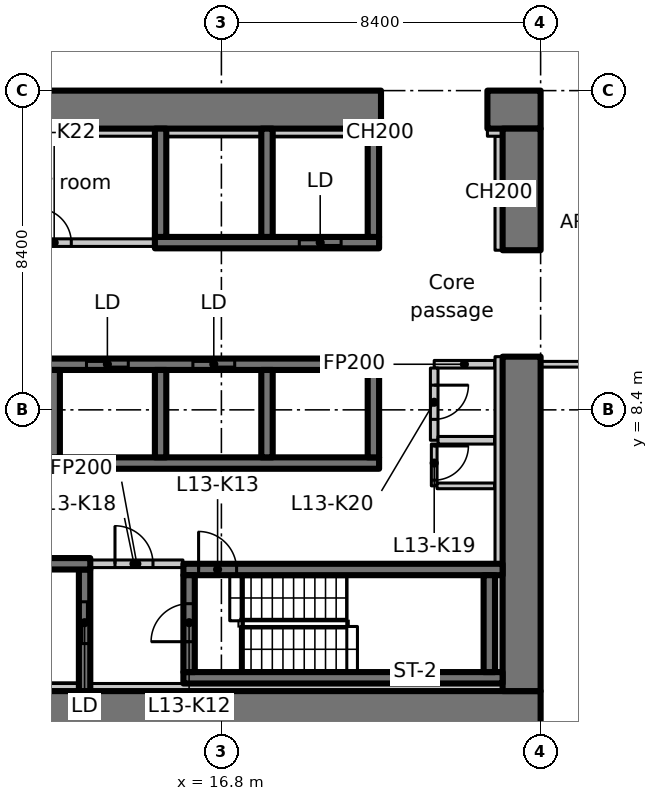
"""IFC4 building model, lengths in metres.
Left out: names, types, materials, properties, quantities, classifications, styles, units other than length and angle.
Written with IfcOpenShell. Run it as: python <this file> out.ifc"""

import sys

from ifc_helpers import new_model, si_unit, direction, frame, frame_2d, origin, place, context, subcontext, project, spatial, rectangle, extrude, element, fill, save


model = new_model("IFC4")
c1 = context("Model", 3, precision=1e-05, world=origin(), true_north=direction((0.0, 1.0)))
c2 = subcontext(c1, "Body", "Model", "MODEL_VIEW")
j1 = project(units=[si_unit("LENGTHUNIT", "METRE"), si_unit("PLANEANGLEUNIT", "RADIAN")], contexts=[c1])
p1 = place(None, origin())
s1 = spatial("IfcSite", under=j1, at=p1, CompositionType="ELEMENT")
p2 = place(p1, origin())
s2 = spatial("IfcBuilding", under=s1, at=p2, CompositionType="ELEMENT")
p3 = place(p2, frame((0.0, 0.0, 61.7)))
s3 = spatial("IfcBuildingStorey", under=s2, at=p3, CompositionType="ELEMENT", Elevation=61.7)
p4 = place(p3, frame((6.936, 0.5, 0.0), z_axis=(0.0, 0.0, 1.0), x_axis=(1.0, 0.0, 0.0)))
e1 = element("IfcWall", 1, at=p4, inside=s3, PredefinedType="SHEAR", context=c2, shape_type="SweptSolid", body=[
    extrude(rectangle(XDim=18.264, YDim=1.0, at=frame_2d((9.132, 0.0))), origin(), (0.0, 0.0, 1.0), 3.35),
])
p5 = place(p3, frame((-1.1, 16.3, 0.0), z_axis=(0.0, 0.0, 1.0), x_axis=(1.0, 0.0, 0.0)))
e2 = element("IfcWall", 2, at=p5, inside=s3, PredefinedType="SHEAR", context=c2, shape_type="SweptSolid", body=[
    extrude(rectangle(XDim=22.1, YDim=1.0, at=frame_2d((11.05, 0.0))), origin(), (0.0, 0.0, 1.0), 3.35),
])
p6 = place(p5, frame((3.15, 0.0, 0.0)))
e3 = element("IfcOpeningElement", 3, at=p6, cuts=e2, PredefinedType="OPENING", context=c2, shape_type="SweptSolid", body=[
    extrude(rectangle(XDim=1.1, YDim=2.3, at=frame_2d((0.55, 1.15))), frame((0.0, 0.51, 0.0), z_axis=(0.0, -1.0, 0.0), x_axis=(1.0, 0.0, 0.0)), (0.0, 0.0, 1.0), 1.02),
])
p7 = place(p3, frame((23.8, 16.3, 0.0), z_axis=(0.0, 0.0, 1.0), x_axis=(1.0, 0.0, 0.0)))
e4 = element("IfcWall", 4, at=p7, inside=s3, PredefinedType="SHEAR", context=c2, shape_type="SweptSolid", body=[
    extrude(rectangle(XDim=1.4, YDim=1.0, at=frame_2d((0.7, 0.0))), origin(), (0.0, 0.0, 1.0), 3.35),
])
p8 = place(p3, frame((24.7, 1.0, 0.0), z_axis=(0.0, 0.0, 1.0), x_axis=(0.0, 1.0, 0.0)))
e5 = element("IfcWall", 5, at=p8, inside=s3, PredefinedType="SHEAR", context=c2, shape_type="SweptSolid", body=[
    extrude(rectangle(XDim=8.8, YDim=1.0, at=frame_2d((4.4, 0.0))), origin(), (0.0, 0.0, 1.0), 3.35),
])
p9 = place(p3, frame((24.7, 12.6, 0.0), z_axis=(0.0, 0.0, 1.0), x_axis=(0.0, 1.0, 0.0)))
e6 = element("IfcWall", 6, at=p9, inside=s3, PredefinedType="SHEAR", context=c2, shape_type="SweptSolid", body=[
    extrude(rectangle(XDim=3.2, YDim=1.0, at=frame_2d((1.6, 0.0))), origin(), (0.0, 0.0, 1.0), 3.35),
])
p10 = place(p3, frame((24.1, 12.6, 0.0), z_axis=(0.0, 0.0, 1.0), x_axis=(0.0, 1.0, 0.0)))
e7 = element("IfcWall", 7, at=p10, inside=s3, PredefinedType="PARTITIONING", context=c2, shape_type="SweptSolid", body=[
    extrude(rectangle(XDim=3.0, YDim=0.2, at=frame_2d((1.5, 0.0))), origin(), (0.0, 0.0, 1.0), 3.35),
])
p11 = place(p3, frame((23.8, 15.7, 0.0), z_axis=(0.0, 0.0, 1.0), x_axis=(1.0, 0.0, 0.0)))
e8 = element("IfcWall", 8, at=p11, inside=s3, PredefinedType="PARTITIONING", context=c2, shape_type="SweptSolid", body=[
    extrude(rectangle(XDim=0.4, YDim=0.2, at=frame_2d((0.2, 0.0))), origin(), (0.0, 0.0, 1.0), 3.35),
])
p12 = place(p3, frame((1.0, 7.0, 0.0), z_axis=(0.0, 0.0, 1.0), x_axis=(1.0, 0.0, 0.0)))
e9 = element("IfcWall", 9, at=p12, inside=s3, PredefinedType="SHEAR", context=c2, shape_type="SweptSolid", body=[
    extrude(rectangle(XDim=19.95, YDim=0.3, at=frame_2d((9.975, 0.0))), origin(), (0.0, 0.0, 1.0), 3.35),
])
p13 = place(p3, frame((1.0, 9.6, 0.0), z_axis=(0.0, 0.0, 1.0), x_axis=(1.0, 0.0, 0.0)))
e10 = element("IfcWall", 10, at=p13, inside=s3, PredefinedType="SHEAR", context=c2, shape_type="SweptSolid", body=[
    extrude(rectangle(XDim=19.95, YDim=0.3, at=frame_2d((9.975, 0.0))), origin(), (0.0, 0.0, 1.0), 3.35),
])
p14 = place(p13, frame((1.05, 0.0, 0.0)))
e11 = element("IfcOpeningElement", 11, at=p14, cuts=e10, PredefinedType="OPENING", context=c2, shape_type="SweptSolid", body=[
    extrude(rectangle(XDim=1.1, YDim=2.3, at=frame_2d((0.55, 1.15))), frame((0.0, 0.16, 0.0), z_axis=(0.0, -1.0, 0.0), x_axis=(1.0, 0.0, 0.0)), (0.0, 0.0, 1.0), 0.32),
])
p15 = place(p13, frame((3.85, 0.0, 0.0)))
e12 = element("IfcOpeningElement", 12, at=p15, cuts=e10, PredefinedType="OPENING", context=c2, shape_type="SweptSolid", body=[
    extrude(rectangle(XDim=1.1, YDim=2.3, at=frame_2d((0.55, 1.15))), frame((0.0, 0.16, 0.0), z_axis=(0.0, -1.0, 0.0), x_axis=(1.0, 0.0, 0.0)), (0.0, 0.0, 1.0), 0.32),
])
p16 = place(p13, frame((6.65, 0.0, 0.0)))
e13 = element("IfcOpeningElement", 13, at=p16, cuts=e10, PredefinedType="OPENING", context=c2, shape_type="SweptSolid", body=[
    extrude(rectangle(XDim=1.1, YDim=2.3, at=frame_2d((0.55, 1.15))), frame((0.0, 0.16, 0.0), z_axis=(0.0, -1.0, 0.0), x_axis=(1.0, 0.0, 0.0)), (0.0, 0.0, 1.0), 0.32),
])
p17 = place(p13, frame((9.45, 0.0, 0.0)))
e14 = element("IfcOpeningElement", 14, at=p17, cuts=e10, PredefinedType="OPENING", context=c2, shape_type="SweptSolid", body=[
    extrude(rectangle(XDim=1.1, YDim=2.3, at=frame_2d((0.55, 1.15))), frame((0.0, 0.16, 0.0), z_axis=(0.0, -1.0, 0.0), x_axis=(1.0, 0.0, 0.0)), (0.0, 0.0, 1.0), 0.32),
])
p18 = place(p13, frame((12.25, 0.0, 0.0)))
e15 = element("IfcOpeningElement", 15, at=p18, cuts=e10, PredefinedType="OPENING", context=c2, shape_type="SweptSolid", body=[
    extrude(rectangle(XDim=1.1, YDim=2.3, at=frame_2d((0.55, 1.15))), frame((0.0, 0.16, 0.0), z_axis=(0.0, -1.0, 0.0), x_axis=(1.0, 0.0, 0.0)), (0.0, 0.0, 1.0), 0.32),
])
p19 = place(p13, frame((15.05, 0.0, 0.0)))
e16 = element("IfcOpeningElement", 16, at=p19, cuts=e10, PredefinedType="OPENING", context=c2, shape_type="SweptSolid", body=[
    extrude(rectangle(XDim=1.1, YDim=2.3, at=frame_2d((0.55, 1.15))), frame((0.0, 0.16, 0.0), z_axis=(0.0, -1.0, 0.0), x_axis=(1.0, 0.0, 0.0)), (0.0, 0.0, 1.0), 0.32),
])
for number, where, z_axis, x_axis in (
    (17, (12.4, 7.15, 0.0), (0.0, 0.0, 1.0), (0.0, 1.0, 0.0)),
    (18, (15.2, 7.15, 0.0), (0.0, 0.0, 1.0), (0.0, 1.0, 0.0)),
    (19, (18.0, 7.15, 0.0), (0.0, 0.0, 1.0), (0.0, 1.0, 0.0)),
    (20, (20.8, 7.15, 0.0), (0.0, 0.0, 1.0), (0.0, 1.0, 0.0)),
):
    element("IfcWall", number, at=place(p3, frame(where, z_axis=z_axis, x_axis=x_axis)), inside=s3, PredefinedType="SHEAR", context=c2, shape_type="SweptSolid", body=[
        extrude(rectangle(XDim=2.3, YDim=0.3, at=frame_2d((1.15, 0.0))), origin(), (0.0, 0.0, 1.0), 3.35),
    ])
p20 = place(p3, frame((15.05, 12.8, 0.0), z_axis=(0.0, 0.0, 1.0), x_axis=(1.0, 0.0, 0.0)))
e21 = element("IfcWall", 21, at=p20, inside=s3, PredefinedType="SHEAR", context=c2, shape_type="SweptSolid", body=[
    extrude(rectangle(XDim=5.9, YDim=0.3, at=frame_2d((2.95, 0.0))), origin(), (0.0, 0.0, 1.0), 3.35),
])
p21 = place(p20, frame((3.8, 0.0, 0.0)))
e22 = element("IfcOpeningElement", 22, at=p21, cuts=e21, PredefinedType="OPENING", context=c2, shape_type="SweptSolid", body=[
    extrude(rectangle(XDim=1.1, YDim=2.3, at=frame_2d((0.55, 1.15))), frame((0.0, 0.16, 0.0), z_axis=(0.0, -1.0, 0.0), x_axis=(1.0, 0.0, 0.0)), (0.0, 0.0, 1.0), 0.32),
])
for number, where, z_axis, x_axis in (
    (23, (15.2, 12.95, 0.0), (0.0, 0.0, 1.0), (0.0, 1.0, 0.0)),
    (24, (18.0, 12.95, 0.0), (0.0, 0.0, 1.0), (0.0, 1.0, 0.0)),
    (25, (20.8, 12.95, 0.0), (0.0, 0.0, 1.0), (0.0, 1.0, 0.0)),
):
    element("IfcWall", number, at=place(p3, frame(where, z_axis=z_axis, x_axis=x_axis)), inside=s3, PredefinedType="SHEAR", context=c2, shape_type="SweptSolid", body=[
        extrude(rectangle(XDim=2.85, YDim=0.3, at=frame_2d((1.425, 0.0))), origin(), (0.0, 0.0, 1.0), 3.35),
    ])
p22 = place(p3, frame((13.2, 1.0, 0.0), z_axis=(0.0, 0.0, 1.0), x_axis=(0.0, 1.0, 0.0)))
e26 = element("IfcWall", 26, at=p22, inside=s3, PredefinedType="SHEAR", context=c2, shape_type="SweptSolid", body=[
    extrude(rectangle(XDim=3.2, YDim=0.3, at=frame_2d((1.6, 0.0))), origin(), (0.0, 0.0, 1.0), 3.35),
])
p23 = place(p22, frame((1.25, 0.0, 0.0)))
e27 = element("IfcOpeningElement", 27, at=p23, cuts=e26, PredefinedType="OPENING", context=c2, shape_type="SweptSolid", body=[
    extrude(rectangle(XDim=1.1, YDim=2.3, at=frame_2d((0.55, 1.15))), frame((0.0, 0.16, 0.0), z_axis=(0.0, -1.0, 0.0), x_axis=(1.0, 0.0, 0.0)), (0.0, 0.0, 1.0), 0.32),
])
p24 = place(p3, frame((10.05, 4.35, 0.0), z_axis=(0.0, 0.0, 1.0), x_axis=(1.0, 0.0, 0.0)))
e28 = element("IfcWall", 28, at=p24, inside=s3, PredefinedType="SHEAR", context=c2, shape_type="SweptSolid", body=[
    extrude(rectangle(XDim=3.3, YDim=0.3, at=frame_2d((1.65, 0.0))), origin(), (0.0, 0.0, 1.0), 3.35),
])
p25 = place(p3, frame((15.8, 1.35, 0.0), z_axis=(0.0, 0.0, 1.0), x_axis=(1.0, 0.0, 0.0)))
e29 = element("IfcWall", 29, at=p25, inside=s3, PredefinedType="SHEAR", context=c2, shape_type="SweptSolid", body=[
    extrude(rectangle(XDim=8.4, YDim=0.3, at=frame_2d((4.2, 0.0))), origin(), (0.0, 0.0, 1.0), 3.35),
])
p26 = place(p3, frame((15.8, 4.2, 0.0), z_axis=(0.0, 0.0, 1.0), x_axis=(1.0, 0.0, 0.0)))
e30 = element("IfcWall", 30, at=p26, inside=s3, PredefinedType="SHEAR", context=c2, shape_type="SweptSolid", body=[
    extrude(rectangle(XDim=8.4, YDim=0.3, at=frame_2d((4.2, 0.0))), origin(), (0.0, 0.0, 1.0), 3.35),
])
p27 = place(p26, frame((0.4, 0.0, 0.0)))
e31 = element("IfcOpeningElement", 31, at=p27, cuts=e30, PredefinedType="OPENING", context=c2, shape_type="SweptSolid", body=[
    extrude(rectangle(XDim=1.0, YDim=2.1, at=frame_2d((0.5, 1.05))), frame((0.0, 0.16, 0.0), z_axis=(0.0, -1.0, 0.0), x_axis=(1.0, 0.0, 0.0)), (0.0, 0.0, 1.0), 0.32),
])
p28 = place(p3, frame((15.95, 1.5, 0.0), z_axis=(0.0, 0.0, 1.0), x_axis=(0.0, 1.0, 0.0)))
e32 = element("IfcWall", 32, at=p28, inside=s3, PredefinedType="SHEAR", context=c2, shape_type="SweptSolid", body=[
    extrude(rectangle(XDim=2.55, YDim=0.3, at=frame_2d((1.275, 0.0))), origin(), (0.0, 0.0, 1.0), 3.35),
])
p29 = place(p28, frame((0.8, 0.0, 0.0)))
e33 = element("IfcOpeningElement", 33, at=p29, cuts=e32, PredefinedType="OPENING", context=c2, shape_type="SweptSolid", body=[
    extrude(rectangle(XDim=1.0, YDim=2.1, at=frame_2d((0.5, 1.05))), frame((0.0, 0.16, 0.0), z_axis=(0.0, -1.0, 0.0), x_axis=(1.0, 0.0, 0.0)), (0.0, 0.0, 1.0), 0.32),
])
p30 = place(p3, frame((23.85, 1.5, 0.0), z_axis=(0.0, 0.0, 1.0), x_axis=(0.0, 1.0, 0.0)))
e34 = element("IfcWall", 34, at=p30, inside=s3, PredefinedType="SHEAR", context=c2, shape_type="SweptSolid", body=[
    extrude(rectangle(XDim=2.55, YDim=0.3, at=frame_2d((1.275, 0.0))), origin(), (0.0, 0.0, 1.0), 3.35),
])
p31 = place(p3, frame((13.362, 4.35, 0.0), z_axis=(0.0, 0.0, 1.0), x_axis=(1.0, 0.0, 0.0)))
e35 = element("IfcWall", 35, at=p31, inside=s3, PredefinedType="PARTITIONING", context=c2, shape_type="SweptSolid", body=[
    extrude(rectangle(XDim=2.426, YDim=0.2, at=frame_2d((1.213, 0.0))), origin(), (0.0, 0.0, 1.0), 3.35),
])
p32 = place(p31, frame((0.638, 0.0, 0.0)))
e36 = element("IfcOpeningElement", 36, at=p32, cuts=e35, PredefinedType="OPENING", context=c2, shape_type="SweptSolid", body=[
    extrude(rectangle(XDim=1.0, YDim=2.1, at=frame_2d((0.5, 1.05))), frame((0.0, 0.11, 0.0), z_axis=(0.0, -1.0, 0.0), x_axis=(1.0, 0.0, 0.0)), (0.0, 0.0, 1.0), 0.22),
])
p33 = place(p3, frame((9.7, 12.8, 0.0), z_axis=(0.0, 0.0, 1.0), x_axis=(1.0, 0.0, 0.0)))
e37 = element("IfcWall", 37, at=p33, inside=s3, PredefinedType="PARTITIONING", context=c2, shape_type="SweptSolid", body=[
    extrude(rectangle(XDim=5.338, YDim=0.2, at=frame_2d((2.669, 0.0))), origin(), (0.0, 0.0, 1.0), 3.35),
])
p34 = place(p33, frame((2.25, 0.0, 0.0)))
e38 = element("IfcOpeningElement", 38, at=p34, cuts=e37, PredefinedType="OPENING", context=c2, shape_type="SweptSolid", body=[
    extrude(rectangle(XDim=0.9, YDim=2.1, at=frame_2d((0.45, 1.05))), frame((0.0, 0.11, 0.0), z_axis=(0.0, -1.0, 0.0), x_axis=(1.0, 0.0, 0.0)), (0.0, 0.0, 1.0), 0.22),
])
p35 = place(p3, frame((23.988, 9.6, 0.0), z_axis=(0.0, 0.0, 1.0), x_axis=(-1.0, 0.0, 0.0)))
e39 = element("IfcWall", 39, at=p35, inside=s3, PredefinedType="PARTITIONING", context=c2, shape_type="SweptSolid", body=[
    extrude(rectangle(XDim=1.588, YDim=0.2, at=frame_2d((0.794, 0.0))), origin(), (0.0, 0.0, 1.0), 3.35),
])
p36 = place(p3, frame((22.4, 9.5, 0.0), z_axis=(0.0, 0.0, 1.0), x_axis=(0.0, -1.0, 0.0)))
e40 = element("IfcWall", 40, at=p36, inside=s3, PredefinedType="PARTITIONING", context=c2, shape_type="SweptSolid", body=[
    extrude(rectangle(XDim=1.9, YDim=0.2, at=frame_2d((0.95, 0.0))), origin(), (0.0, 0.0, 1.0), 3.35),
])
p37 = place(p36, frame((0.45, 0.0, 0.0)))
e41 = element("IfcOpeningElement", 41, at=p37, cuts=e40, PredefinedType="OPENING", context=c2, shape_type="SweptSolid", body=[
    extrude(rectangle(XDim=0.9, YDim=2.1, at=frame_2d((0.45, 1.05))), frame((0.0, 0.11, 0.0), z_axis=(0.0, -1.0, 0.0), x_axis=(1.0, 0.0, 0.0)), (0.0, 0.0, 1.0), 0.22),
])
p38 = place(p3, frame((22.5, 7.6, 0.0), z_axis=(0.0, 0.0, 1.0), x_axis=(1.0, 0.0, 0.0)))
e42 = element("IfcWall", 42, at=p38, inside=s3, PredefinedType="PARTITIONING", context=c2, shape_type="SweptSolid", body=[
    extrude(rectangle(XDim=1.488, YDim=0.2, at=frame_2d((0.744, 0.0))), origin(), (0.0, 0.0, 1.0), 3.35),
])
p39 = place(p3, frame((22.4, 7.5, 0.0), z_axis=(0.0, 0.0, 1.0), x_axis=(0.0, -1.0, 0.0)))
e43 = element("IfcWall", 43, at=p39, inside=s3, PredefinedType="PARTITIONING", context=c2, shape_type="SweptSolid", body=[
    extrude(rectangle(XDim=1.1, YDim=0.15, at=frame_2d((0.55, 0.0))), origin(), (0.0, 0.0, 1.0), 3.35),
])
p40 = place(p39, frame((0.05, 0.0, 0.0)))
e44 = element("IfcOpeningElement", 44, at=p40, cuts=e43, PredefinedType="OPENING", context=c2, shape_type="SweptSolid", body=[
    extrude(rectangle(XDim=0.9, YDim=2.1, at=frame_2d((0.45, 1.05))), frame((0.0, 0.085, 0.0), z_axis=(0.0, -1.0, 0.0), x_axis=(1.0, 0.0, 0.0)), (0.0, 0.0, 1.0), 0.17),
])
p41 = place(p3, frame((22.475, 6.4, 0.0), z_axis=(0.0, 0.0, 1.0), x_axis=(1.0, 0.0, 0.0)))
e45 = element("IfcWall", 45, at=p41, inside=s3, PredefinedType="PARTITIONING", context=c2, shape_type="SweptSolid", body=[
    extrude(rectangle(XDim=1.513, YDim=0.15, at=frame_2d((0.756, 0.0))), origin(), (0.0, 0.0, 1.0), 3.35),
])
p42 = place(p3, frame((4.15, 15.7, 0.0), z_axis=(0.0, 0.0, 1.0), x_axis=(1.0, 0.0, 0.0)))
e46 = element("IfcWall", 46, at=p42, inside=s3, PredefinedType="PARTITIONING", context=c2, shape_type="SweptSolid", body=[
    extrude(rectangle(XDim=10.9, YDim=0.2, at=frame_2d((5.45, 0.0))), origin(), (0.0, 0.0, 1.0), 3.35),
])
for number, where, z_axis, x_axis in (
    (47, (15.35, 15.7, 0.0), (0.0, 0.0, 1.0), (1.0, 0.0, 0.0)),
    (48, (18.15, 15.7, 0.0), (0.0, 0.0, 1.0), (1.0, 0.0, 0.0)),
):
    element("IfcWall", number, at=place(p3, frame(where, z_axis=z_axis, x_axis=x_axis)), inside=s3, PredefinedType="PARTITIONING", context=c2, shape_type="SweptSolid", body=[
        extrude(rectangle(XDim=2.5, YDim=0.2, at=frame_2d((1.25, 0.0))), origin(), (0.0, 0.0, 1.0), 3.35),
    ])
p43 = place(p3, frame((20.95, 15.7, 0.0), z_axis=(0.0, 0.0, 1.0), x_axis=(1.0, 0.0, 0.0)))
e49 = element("IfcWall", 49, at=p43, inside=s3, PredefinedType="PARTITIONING", context=c2, shape_type="SweptSolid", body=[
    extrude(rectangle(XDim=0.05, YDim=0.2, at=frame_2d((0.025, 0.0))), origin(), (0.0, 0.0, 1.0), 3.35),
])
p44 = place(p3, frame((10.35, 1.1, 0.0), z_axis=(0.0, 0.0, 1.0), x_axis=(1.0, 0.0, 0.0)))
e50 = element("IfcWall", 50, at=p44, inside=s3, PredefinedType="PARTITIONING", context=c2, shape_type="SweptSolid", body=[
    extrude(rectangle(XDim=2.7, YDim=0.2, at=frame_2d((1.35, 0.0))), origin(), (0.0, 0.0, 1.0), 3.35),
])
p45 = place(p3, frame((13.35, 1.1, 0.0), z_axis=(0.0, 0.0, 1.0), x_axis=(1.0, 0.0, 0.0)))
e51 = element("IfcWall", 51, at=p45, inside=s3, PredefinedType="PARTITIONING", context=c2, shape_type="SweptSolid", body=[
    extrude(rectangle(XDim=10.85, YDim=0.2, at=frame_2d((5.425, 0.0))), origin(), (0.0, 0.0, 1.0), 3.35),
])
p46 = place(p3, frame((24.1, 1.5, 0.0), z_axis=(0.0, 0.0, 1.0), x_axis=(0.0, 1.0, 0.0)))
e52 = element("IfcWall", 52, at=p46, inside=s3, PredefinedType="PARTITIONING", context=c2, shape_type="SweptSolid", body=[
    extrude(rectangle(XDim=2.55, YDim=0.2, at=frame_2d((1.275, 0.0))), origin(), (0.0, 0.0, 1.0), 3.35),
])
p47 = place(p3, frame((24.1, 4.35, 0.0), z_axis=(0.0, 0.0, 1.0), x_axis=(0.0, 1.0, 0.0)))
e53 = element("IfcWall", 53, at=p47, inside=s3, PredefinedType="PARTITIONING", context=c2, shape_type="SweptSolid", body=[
    extrude(rectangle(XDim=5.45, YDim=0.2, at=frame_2d((2.725, 0.0))), origin(), (0.0, 0.0, 1.0), 3.35),
])
p48 = place(p3, frame((29.4, 9.6, 0.0), z_axis=(0.0, 0.0, 1.0), x_axis=(-1.0, 0.0, 0.0)))
e54 = element("IfcWall", 54, at=p48, inside=s3, PredefinedType="PARTITIONING", context=c2, shape_type="SweptSolid", body=[
    extrude(rectangle(XDim=4.2, YDim=0.15, at=frame_2d((2.1, 0.0))), origin(), (0.0, 0.0, 1.0), 3.33),
])
p49 = place(p48, frame((1.5, 0.0, 0.0)))
e55 = element("IfcOpeningElement", 55, at=p49, cuts=e54, PredefinedType="OPENING", context=c2, shape_type="SweptSolid", body=[
    extrude(rectangle(XDim=1.1, YDim=2.1, at=frame_2d((0.55, 1.05))), frame((0.0, 0.085, 0.0), z_axis=(0.0, -1.0, 0.0), x_axis=(1.0, 0.0, 0.0)), (0.0, 0.0, 1.0), 0.17),
])
p50 = place(p18, origin())
e56 = element("IfcDoor", 56, at=p50, inside=s3, OperationType="SLIDING_TO_LEFT", PredefinedType="DOOR", context=c2, shape_type="SweptSolid", body=[
    extrude(rectangle(XDim=1.1, YDim=2.3, at=frame_2d((0.55, 1.15))), frame((0.0, 0.025, 0.0), z_axis=(0.0, -1.0, 0.0), x_axis=(1.0, 0.0, 0.0)), (0.0, 0.0, 1.0), 0.05),
])
fill(e15, e56)
p51 = place(p19, origin())
e57 = element("IfcDoor", 57, at=p51, inside=s3, OperationType="SLIDING_TO_LEFT", PredefinedType="DOOR", context=c2, shape_type="SweptSolid", body=[
    extrude(rectangle(XDim=1.1, YDim=2.3, at=frame_2d((0.55, 1.15))), frame((0.0, 0.025, 0.0), z_axis=(0.0, -1.0, 0.0), x_axis=(1.0, 0.0, 0.0)), (0.0, 0.0, 1.0), 0.05),
])
fill(e16, e57)
p52 = place(p21, origin())
e58 = element("IfcDoor", 58, at=p52, inside=s3, OperationType="SLIDING_TO_LEFT", PredefinedType="DOOR", context=c2, shape_type="SweptSolid", body=[
    extrude(rectangle(XDim=1.1, YDim=2.3, at=frame_2d((0.55, 1.15))), frame((0.0, 0.025, 0.0), z_axis=(0.0, -1.0, 0.0), x_axis=(1.0, 0.0, 0.0)), (0.0, 0.0, 1.0), 0.05),
])
fill(e22, e58)
p53 = place(p23, origin())
e59 = element("IfcDoor", 59, at=p53, inside=s3, OperationType="SLIDING_TO_LEFT", PredefinedType="DOOR", context=c2, shape_type="SweptSolid", body=[
    extrude(rectangle(XDim=1.1, YDim=2.3, at=frame_2d((0.55, 1.15))), frame((0.0, 0.025, 0.0), z_axis=(0.0, -1.0, 0.0), x_axis=(1.0, 0.0, 0.0)), (0.0, 0.0, 1.0), 0.05),
])
fill(e27, e59)
p54 = place(p29, origin())
e60 = element("IfcDoor", 60, at=p54, inside=s3, OperationType="SINGLE_SWING_LEFT", PredefinedType="DOOR", context=c2, shape_type="SweptSolid", body=[
    extrude(rectangle(XDim=1.0, YDim=2.1, at=frame_2d((0.5, 1.05))), frame((0.0, 0.025, 0.0), z_axis=(0.0, -1.0, 0.0), x_axis=(1.0, 0.0, 0.0)), (0.0, 0.0, 1.0), 0.05),
])
fill(e33, e60)
p55 = place(p27, origin())
e61 = element("IfcDoor", 61, at=p55, inside=s3, OperationType="SINGLE_SWING_RIGHT", PredefinedType="DOOR", context=c2, shape_type="SweptSolid", body=[
    extrude(rectangle(XDim=1.0, YDim=2.1, at=frame_2d((0.5, 1.05))), frame((0.0, 0.025, 0.0), z_axis=(0.0, -1.0, 0.0), x_axis=(1.0, 0.0, 0.0)), (0.0, 0.0, 1.0), 0.05),
])
fill(e31, e61)
p56 = place(p32, origin())
e62 = element("IfcDoor", 62, at=p56, inside=s3, OperationType="SINGLE_SWING_LEFT", PredefinedType="DOOR", context=c2, shape_type="SweptSolid", body=[
    extrude(rectangle(XDim=1.0, YDim=2.1, at=frame_2d((0.5, 1.05))), frame((0.0, 0.025, 0.0), z_axis=(0.0, -1.0, 0.0), x_axis=(1.0, 0.0, 0.0)), (0.0, 0.0, 1.0), 0.05),
])
fill(e36, e62)
p57 = place(p40, origin())
e63 = element("IfcDoor", 63, at=p57, inside=s3, OperationType="SINGLE_SWING_RIGHT", PredefinedType="DOOR", context=c2, shape_type="SweptSolid", body=[
    extrude(rectangle(XDim=0.9, YDim=2.1, at=frame_2d((0.45, 1.05))), frame((0.0, 0.025, 0.0), z_axis=(0.0, -1.0, 0.0), x_axis=(1.0, 0.0, 0.0)), (0.0, 0.0, 1.0), 0.05),
])
fill(e44, e63)
p58 = place(p37, origin())
e64 = element("IfcDoor", 64, at=p58, inside=s3, OperationType="SINGLE_SWING_LEFT", PredefinedType="DOOR", context=c2, shape_type="SweptSolid", body=[
    extrude(rectangle(XDim=0.9, YDim=2.1, at=frame_2d((0.45, 1.05))), frame((0.0, 0.025, 0.0), z_axis=(0.0, -1.0, 0.0), x_axis=(1.0, 0.0, 0.0)), (0.0, 0.0, 1.0), 0.05),
])
fill(e41, e64)
p59 = place(p34, origin())
e65 = element("IfcDoor", 65, at=p59, inside=s3, OperationType="SINGLE_SWING_LEFT", PredefinedType="DOOR", context=c2, shape_type="SweptSolid", body=[
    extrude(rectangle(XDim=0.9, YDim=2.1, at=frame_2d((0.45, 1.05))), frame((0.0, 0.025, 0.0), z_axis=(0.0, -1.0, 0.0), x_axis=(1.0, 0.0, 0.0)), (0.0, 0.0, 1.0), 0.05),
])
fill(e38, e65)
save(model, sys.argv[1])
